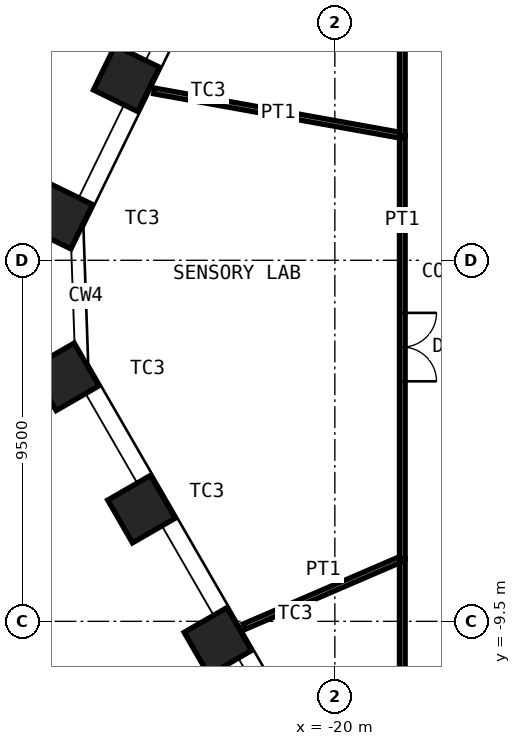
"""IFC4 building model, lengths in metres.
Left out: names, types, materials, properties, quantities, classifications, styles, units other than length and angle.
Written with IfcOpenShell. Run it as: python <this file> out.ifc"""

import sys

from ifc_helpers import new_model, si_unit, direction, frame, frame_2d, origin, origin_2d, place, context, subcontext, project, spatial, rectangle, hollow_rectangle, extrude, element, fill, save


model = new_model("IFC4")
c1 = context("Model", 3, precision=1e-05, world=origin(), true_north=direction((0.0, 1.0)))
c2 = subcontext(c1, "Body", "Model", "MODEL_VIEW")
j1 = project(units=[si_unit("LENGTHUNIT", "METRE"), si_unit("PLANEANGLEUNIT", "RADIAN")], contexts=[c1])
p1 = place(None, origin())
s1 = spatial("IfcSite", under=j1, at=p1, CompositionType="ELEMENT")
p2 = place(p1, origin())
s2 = spatial("IfcBuilding", under=s1, at=p2, CompositionType="ELEMENT")
p3 = place(p2, frame((0.0, 0.0, 128.2)))
s3 = spatial("IfcBuildingStorey", under=s2, at=p3, CompositionType="ELEMENT", Elevation=128.2)
for number, where, z_axis, x_axis in (
    (1, (-23.078, -10.028, 0.0), (0.0, 0.0, 1.0), (0.5, -0.866, 0.0)),
    (2, (-25.087, -6.547, 0.0), (0.0, 0.0, 1.0), (0.5, -0.866, 0.0)),
    (3, (-27.097, -3.067, 0.0), (0.0, 0.0, 1.0), (0.5, -0.866, 0.0)),
    (4, (-27.245, 1.169, 0.0), (0.0, 0.0, 1.0), (-0.438, -0.899, 0.0)),
    (5, (-25.483, 4.781, 0.0), (0.0, 0.0, 1.0), (-0.438, -0.899, 0.0)),
):
    element("IfcColumn", number, at=place(p3, frame(where, z_axis=z_axis, x_axis=x_axis)), inside=s3, PredefinedType="COLUMN", context=c2, shape_type="SweptSolid", body=[
        extrude(hollow_rectangle(XDim=1.3, YDim=1.3, WallThickness=0.1, at=origin_2d()), origin(), (0.0, 0.0, 1.0), 4.2),
    ])
p4 = place(p3, frame((-18.225, -11.625, 0.0), z_axis=(0.0, 0.0, 1.0), x_axis=(0.0, 1.0, 0.0)))
e6 = element("IfcWall", 6, at=p4, inside=s3, PredefinedType="PARTITIONING", context=c2, shape_type="SweptSolid", body=[
    extrude(rectangle(XDim=3.776, YDim=0.15, at=frame_2d((1.888, 0.0))), origin(), (0.0, 0.0, 1.0), 4.03),
])
p5 = place(p3, frame((-22.38, -9.638, 0.0), z_axis=(0.0, 0.0, 1.0), x_axis=(0.918428905659, 0.395586078181, 0.0)))
e7 = element("IfcWall", 7, at=p5, inside=s3, PredefinedType="PARTITIONING", context=c2, shape_type="SweptSolid", body=[
    extrude(rectangle(XDim=4.524, YDim=0.15, at=frame_2d((2.262, 0.0))), origin(), (0.0, 0.0, 1.0), 3.33),
])
p6 = place(p3, frame((-18.225, -7.849, 0.0), z_axis=(0.0, 0.0, 1.0), x_axis=(0.0, 1.0, 0.0)))
e8 = element("IfcWall", 8, at=p6, inside=s3, PredefinedType="PARTITIONING", context=c2, shape_type="SweptSolid", body=[
    extrude(rectangle(XDim=11.13, YDim=0.15, at=frame_2d((5.565, 0.0))), origin(), (0.0, 0.0, 1.0), 4.03),
])
p7 = place(p6, frame((4.665, 0.0, 0.0)))
e9 = element("IfcOpeningElement", 9, at=p7, cuts=e8, PredefinedType="OPENING", context=c2, shape_type="SweptSolid", body=[
    extrude(rectangle(XDim=1.8, YDim=2.4, at=frame_2d((0.9, 1.2))), frame((0.0, 0.085, 0.0), z_axis=(0.0, -1.0, 0.0), x_axis=(1.0, 0.0, 0.0)), (0.0, 0.0, 1.0), 0.17),
])
p8 = place(p3, frame((-24.755, 4.457, 0.0), z_axis=(0.0, 0.0, 1.0), x_axis=(0.984174598206, -0.177201467959, 0.0)))
e10 = element("IfcWall", 10, at=p8, inside=s3, PredefinedType="PARTITIONING", context=c2, shape_type="SweptSolid", body=[
    extrude(rectangle(XDim=6.635, YDim=0.15, at=frame_2d((3.318, 0.0))), origin(), (0.0, 0.0, 1.0), 3.33),
])
p9 = place(p3, frame((-18.225, 3.281, 0.0), z_axis=(0.0, 0.0, 1.0), x_axis=(0.0, 1.0, 0.0)))
e11 = element("IfcWall", 11, at=p9, inside=s3, PredefinedType="PARTITIONING", context=c2, shape_type="SweptSolid", body=[
    extrude(rectangle(XDim=8.344, YDim=0.15, at=frame_2d((4.172, 0.0))), origin(), (0.0, 0.0, 1.0), 4.03),
])
p10 = place(p9, frame((3.272, 0.0, 0.0)))
e12 = element("IfcOpeningElement", 12, at=p10, cuts=e11, PredefinedType="OPENING", context=c2, shape_type="SweptSolid", body=[
    extrude(rectangle(XDim=1.8, YDim=2.4, at=frame_2d((0.9, 1.2))), frame((0.0, 0.085, 0.0), z_axis=(0.0, -1.0, 0.0), x_axis=(1.0, 0.0, 0.0)), (0.0, 0.0, 1.0), 0.17),
])
p11 = place(p7, origin())
e13 = element("IfcDoor", 13, at=p11, inside=s3, OperationType="DOUBLE_DOOR_DOUBLE_SWING", PredefinedType="DOOR", context=c2, shape_type="SweptSolid", body=[
    extrude(rectangle(XDim=1.8, YDim=2.4, at=frame_2d((0.9, 1.2))), frame((0.0, 0.025, 0.0), z_axis=(0.0, -1.0, 0.0), x_axis=(1.0, 0.0, 0.0)), (0.0, 0.0, 1.0), 0.05),
])
fill(e9, e13)
save(model, sys.argv[1])
